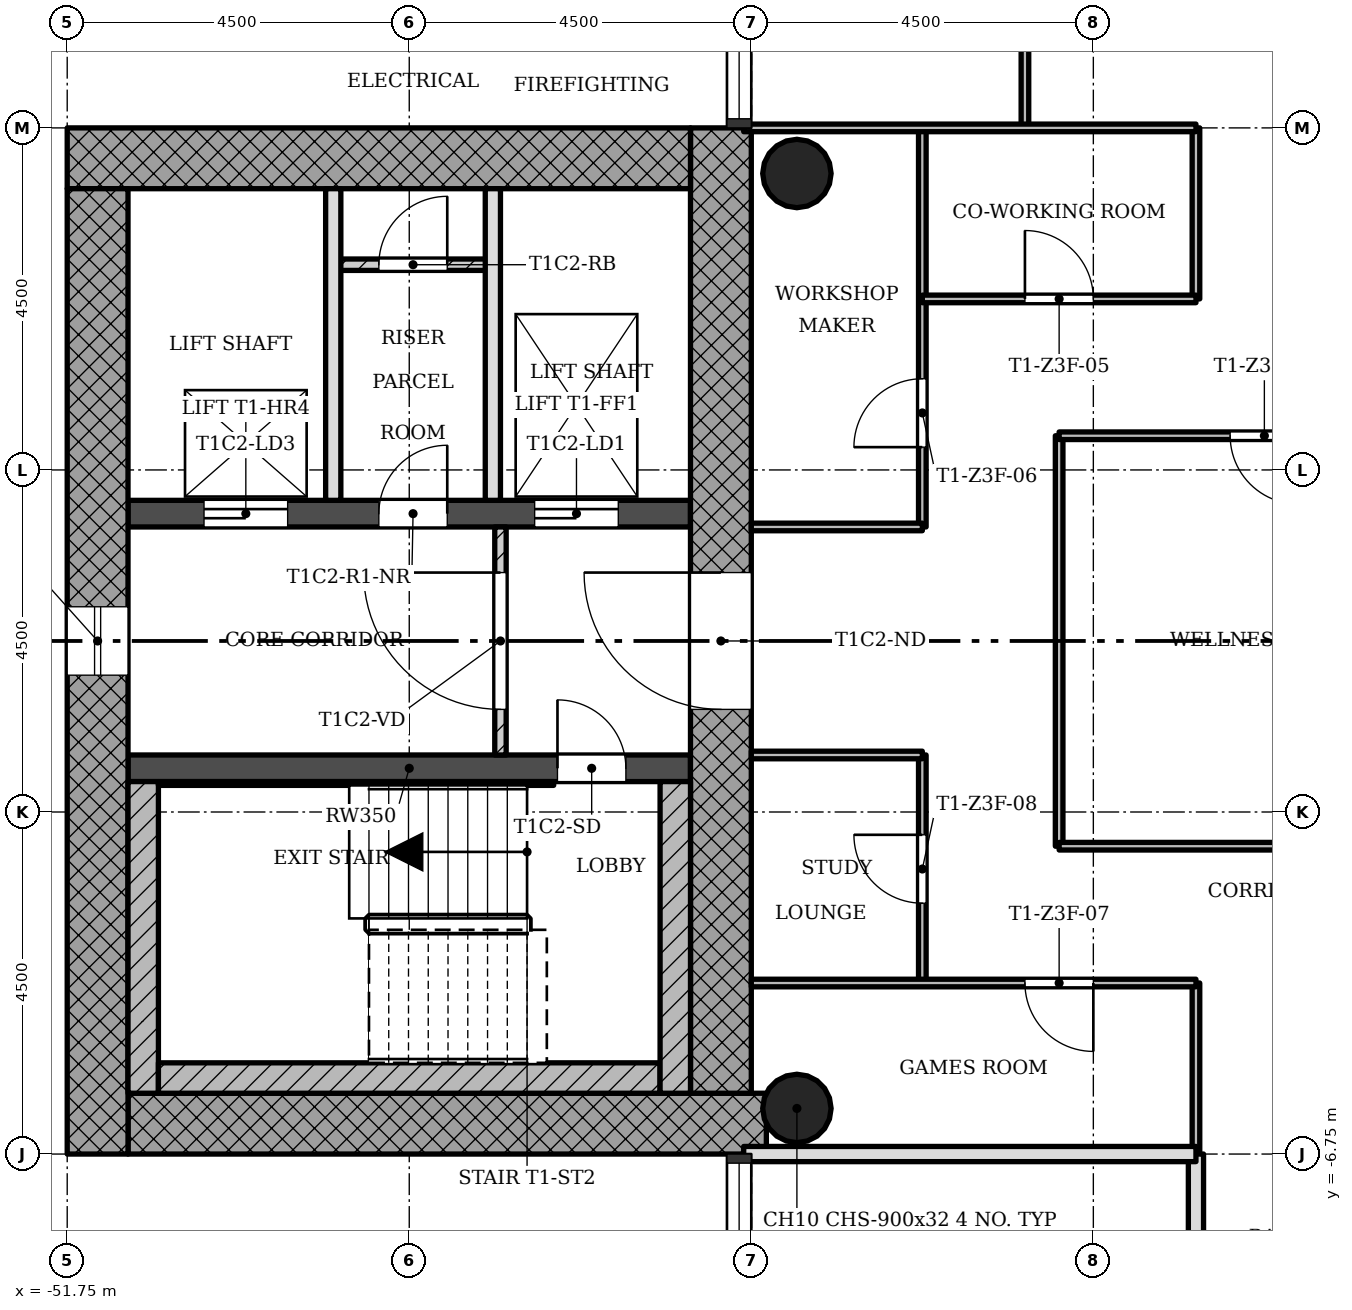
"""IFC4 building model, lengths in metres.
Left out: names, types, materials, properties, quantities, classifications, styles, units other than length and angle.
Written with IfcOpenShell. Run it as: python <this file> out.ifc"""

import sys

from ifc_helpers import new_model, si_unit, direction, frame, frame_2d, origin, origin_2d, place, context, subcontext, project, spatial, rectangle, hollow_circle, extrude, element, fill, save


model = new_model("IFC4")
c1 = context("Model", 3, precision=1e-05, world=origin(), true_north=direction((0.0, 1.0)))
c2 = subcontext(c1, "Body", "Model", "MODEL_VIEW")
j1 = project(units=[si_unit("LENGTHUNIT", "METRE"), si_unit("PLANEANGLEUNIT", "RADIAN")], contexts=[c1])
p1 = place(None, origin())
s1 = spatial("IfcSite", under=j1, at=p1, CompositionType="ELEMENT")
p2 = place(p1, origin())
s2 = spatial("IfcBuilding", under=s1, at=p2, CompositionType="ELEMENT")
p3 = place(p2, frame((0.0, 0.0, 167.7)))
s3 = spatial("IfcBuildingStorey", under=s2, at=p3, CompositionType="ELEMENT", Elevation=167.7)
p4 = place(p3, frame((-50.95, -6.35, 0.0), z_axis=(0.0, 0.0, 1.0), x_axis=(1.0, 0.0, 0.0)))
e1 = element("IfcWall", 1, at=p4, inside=s3, PredefinedType="SHEAR", context=c2, shape_type="SweptSolid", body=[
    extrude(rectangle(XDim=8.398, YDim=0.8, at=frame_2d((4.199, 0.0))), origin(), (0.0, 0.0, 1.0), 3.4),
])
p5 = place(p3, frame((-43.15, -5.95, 0.0), z_axis=(0.0, 0.0, 1.0), x_axis=(0.0, 1.0, 0.0)))
e2 = element("IfcWall", 2, at=p5, inside=s3, PredefinedType="SHEAR", context=c2, shape_type="SweptSolid", body=[
    extrude(rectangle(XDim=12.7, YDim=0.8, at=frame_2d((6.35, 0.0))), origin(), (0.0, 0.0, 1.0), 3.4),
])
p6 = place(p5, frame((5.05, 0.0, 0.0)))
e3 = element("IfcOpeningElement", 3, at=p6, cuts=e2, PredefinedType="OPENING", context=c2, shape_type="SweptSolid", body=[
    extrude(rectangle(XDim=1.8, YDim=2.1, at=frame_2d((0.9, 1.05))), frame((0.0, 0.41, 0.0), z_axis=(0.0, -1.0, 0.0), x_axis=(1.0, 0.0, 0.0)), (0.0, 0.0, 1.0), 0.82),
])
p7 = place(p3, frame((-43.55, 6.35, 0.0), z_axis=(0.0, 0.0, 1.0), x_axis=(-1.0, 0.0, 0.0)))
e4 = element("IfcWall", 4, at=p7, inside=s3, PredefinedType="SHEAR", context=c2, shape_type="SweptSolid", body=[
    extrude(rectangle(XDim=8.2, YDim=0.8, at=frame_2d((4.1, 0.0))), origin(), (0.0, 0.0, 1.0), 3.4),
])
p8 = place(p3, frame((-51.35, 5.95, 0.0), z_axis=(0.0, 0.0, 1.0), x_axis=(0.0, -1.0, 0.0)))
e5 = element("IfcWall", 5, at=p8, inside=s3, PredefinedType="SHEAR", context=c2, shape_type="SweptSolid", body=[
    extrude(rectangle(XDim=12.7, YDim=0.8, at=frame_2d((6.35, 0.0))), origin(), (0.0, 0.0, 1.0), 3.4),
])
p9 = place(p8, frame((5.5, 0.0, 0.45)))
e6 = element("IfcOpeningElement", 6, at=p9, cuts=e5, PredefinedType="OPENING", context=c2, shape_type="SweptSolid", body=[
    extrude(rectangle(XDim=0.9, YDim=2.4, at=frame_2d((0.45, 1.2))), frame((0.0, 0.41, 0.0), z_axis=(0.0, -1.0, 0.0), x_axis=(1.0, 0.0, 0.0)), (0.0, 0.0, 1.0), 0.82),
])
p10 = place(p3, frame((-50.95, -1.675, 0.0), z_axis=(0.0, 0.0, 1.0), x_axis=(1.0, 0.0, 0.0)))
e7 = element("IfcWall", 7, at=p10, inside=s3, PredefinedType="SHEAR", context=c2, shape_type="SweptSolid", body=[
    extrude(rectangle(XDim=7.4, YDim=0.35, at=frame_2d((3.7, 0.0))), origin(), (0.0, 0.0, 1.0), 3.4),
])
p11 = place(p10, frame((5.65, 0.0, 0.0)))
e8 = element("IfcOpeningElement", 8, at=p11, cuts=e7, PredefinedType="OPENING", context=c2, shape_type="SweptSolid", body=[
    extrude(rectangle(XDim=0.9, YDim=2.1, at=frame_2d((0.45, 1.05))), frame((0.0, 0.185, 0.0), z_axis=(0.0, -1.0, 0.0), x_axis=(1.0, 0.0, 0.0)), (0.0, 0.0, 1.0), 0.37),
])
p12 = place(p3, frame((-50.95, 1.675, 0.0), z_axis=(0.0, 0.0, 1.0), x_axis=(1.0, 0.0, 0.0)))
e9 = element("IfcWall", 9, at=p12, inside=s3, PredefinedType="SHEAR", context=c2, shape_type="SweptSolid", body=[
    extrude(rectangle(XDim=7.4, YDim=0.35, at=frame_2d((3.7, 0.0))), origin(), (0.0, 0.0, 1.0), 3.4),
])
p13 = place(p12, frame((5.35, 0.0, 0.0)))
e10 = element("IfcOpeningElement", 10, at=p13, cuts=e9, PredefinedType="OPENING", context=c2, shape_type="SweptSolid", body=[
    extrude(rectangle(XDim=1.1, YDim=2.1, at=frame_2d((0.55, 1.05))), frame((0.0, 0.185, 0.0), z_axis=(0.0, -1.0, 0.0), x_axis=(1.0, 0.0, 0.0)), (0.0, 0.0, 1.0), 0.37),
])
p14 = place(p12, frame((1.0, 0.0, 0.0)))
e11 = element("IfcOpeningElement", 11, at=p14, cuts=e9, PredefinedType="OPENING", context=c2, shape_type="SweptSolid", body=[
    extrude(rectangle(XDim=1.1, YDim=2.1, at=frame_2d((0.55, 1.05))), frame((0.0, 0.185, 0.0), z_axis=(0.0, -1.0, 0.0), x_axis=(1.0, 0.0, 0.0)), (0.0, 0.0, 1.0), 0.37),
])
p15 = place(p12, frame((3.3, 0.0, 0.0)))
e12 = element("IfcOpeningElement", 12, at=p15, cuts=e9, PredefinedType="OPENING", context=c2, shape_type="SweptSolid", body=[
    extrude(rectangle(XDim=0.9, YDim=2.1, at=frame_2d((0.45, 1.05))), frame((0.0, 0.185, 0.0), z_axis=(0.0, -1.0, 0.0), x_axis=(1.0, 0.0, 0.0)), (0.0, 0.0, 1.0), 0.37),
])
for number, where, z_axis, x_axis in (
    (13, (-42.15, -6.15, 0.0), (0.0, 0.0, 1.0), (1.0, 0.0, 0.0)),
    (14, (-42.15, 6.15, 0.0), (0.0, 0.0, 1.0), (1.0, 0.0, 0.0)),
):
    element("IfcColumn", number, at=place(p3, frame(where, z_axis=z_axis, x_axis=x_axis)), inside=s3, PredefinedType="COLUMN", context=c2, shape_type="SweptSolid", body=[
        extrude(hollow_circle(Radius=0.45, WallThickness=0.032, at=origin_2d()), origin(), (0.0, 0.0, 1.0), 3.4),
    ])
p16 = place(p3, frame((-46.05, 1.5, 0.0), z_axis=(0.0, 0.0, 1.0), x_axis=(0.0, -1.0, 0.0)))
e15 = element("IfcWall", 15, at=p16, inside=s3, PredefinedType="PARTITIONING", context=c2, shape_type="SweptSolid", body=[
    extrude(rectangle(XDim=3.0, YDim=0.15, at=frame_2d((1.5, 0.0))), origin(), (0.0, 0.0, 1.0), 3.0),
])
p17 = place(p16, frame((0.6, 0.0, 0.0)))
e16 = element("IfcOpeningElement", 16, at=p17, cuts=e15, PredefinedType="OPENING", context=c2, shape_type="SweptSolid", body=[
    extrude(rectangle(XDim=1.8, YDim=2.1, at=frame_2d((0.9, 1.05))), frame((0.0, 0.085, 0.0), z_axis=(0.0, -1.0, 0.0), x_axis=(1.0, 0.0, 0.0)), (0.0, 0.0, 1.0), 0.17),
])
for number, where, z_axis, x_axis in (
    (17, (-48.25, 5.95, 0.0), (0.0, 0.0, 1.0), (0.0, -1.0, 0.0)),
    (18, (-46.15, 5.95, 0.0), (0.0, 0.0, 1.0), (0.0, -1.0, 0.0)),
):
    element("IfcWall", number, at=place(p3, frame(where, z_axis=z_axis, x_axis=x_axis)), inside=s3, PredefinedType="SOLIDWALL", context=c2, shape_type="SweptSolid", body=[
        extrude(rectangle(XDim=4.1, YDim=0.2, at=frame_2d((2.05, 0.0))), origin(), (0.0, 0.0, 1.0), 3.0),
    ])
p18 = place(p3, frame((-46.15, 4.95, 0.0), z_axis=(0.0, 0.0, 1.0), x_axis=(-1.0, 0.0, 0.0)))
e19 = element("IfcWall", 19, at=p18, inside=s3, PredefinedType="PARTITIONING", context=c2, shape_type="SweptSolid", body=[
    extrude(rectangle(XDim=2.1, YDim=0.15, at=frame_2d((1.05, 0.0))), origin(), (0.0, 0.0, 1.0), 3.0),
])
p19 = place(p18, frame((0.6, 0.0, 0.0)))
e20 = element("IfcOpeningElement", 20, at=p19, cuts=e19, PredefinedType="OPENING", context=c2, shape_type="SweptSolid", body=[
    extrude(rectangle(XDim=0.9, YDim=2.1, at=frame_2d((0.45, 1.05))), frame((0.0, 0.085, 0.0), z_axis=(0.0, -1.0, 0.0), x_axis=(1.0, 0.0, 0.0)), (0.0, 0.0, 1.0), 0.17),
])
p20 = place(p3, frame((-40.5, -4.5, 0.0), z_axis=(0.0, 0.0, 1.0), x_axis=(0.0, 1.0, 0.0)))
e21 = element("IfcWall", 21, at=p20, inside=s3, PredefinedType="PARTITIONING", context=c2, shape_type="SweptSolid", body=[
    extrude(rectangle(XDim=3.0, YDim=0.1, at=frame_2d((1.5, 0.0))), origin(), (0.0, 0.0, 1.0), 3.0),
])
p21 = place(p20, frame((1.05, 0.0, 0.0)))
e22 = element("IfcOpeningElement", 22, at=p21, cuts=e21, PredefinedType="OPENING", context=c2, shape_type="SweptSolid", body=[
    extrude(rectangle(XDim=0.9, YDim=2.1, at=frame_2d((0.45, 1.05))), frame((0.0, 0.06, 0.0), z_axis=(0.0, -1.0, 0.0), x_axis=(1.0, 0.0, 0.0)), (0.0, 0.0, 1.0), 0.12),
])
p22 = place(p3, frame((-40.5, 1.5, 0.0), z_axis=(0.0, 0.0, 1.0), x_axis=(0.0, 1.0, 0.0)))
e23 = element("IfcWall", 23, at=p22, inside=s3, PredefinedType="PARTITIONING", context=c2, shape_type="SweptSolid", body=[
    extrude(rectangle(XDim=5.25, YDim=0.1, at=frame_2d((2.625, 0.0))), origin(), (0.0, 0.0, 1.0), 3.0),
])
p23 = place(p22, frame((1.05, 0.0, 0.0)))
e24 = element("IfcOpeningElement", 24, at=p23, cuts=e23, PredefinedType="OPENING", context=c2, shape_type="SweptSolid", body=[
    extrude(rectangle(XDim=0.9, YDim=2.1, at=frame_2d((0.45, 1.05))), frame((0.0, 0.06, 0.0), z_axis=(0.0, -1.0, 0.0), x_axis=(1.0, 0.0, 0.0)), (0.0, 0.0, 1.0), 0.12),
])
p24 = place(p3, frame((-39.15, 6.75, 0.0), z_axis=(0.0, 0.0, 1.0), x_axis=(0.0, 1.0, 0.0)))
e25 = element("IfcWall", 25, at=p24, inside=s3, PredefinedType="PARTITIONING", context=c2, shape_type="SweptSolid", body=[
    extrude(rectangle(XDim=4.5, YDim=0.1, at=frame_2d((2.25, 0.0))), origin(), (0.0, 0.0, 1.0), 3.0),
])
p25 = place(p24, frame((1.8, 0.0, 0.0)))
e26 = element("IfcOpeningElement", 26, at=p25, cuts=e25, PredefinedType="OPENING", context=c2, shape_type="SweptSolid", body=[
    extrude(rectangle(XDim=0.9, YDim=2.1, at=frame_2d((0.45, 1.05))), frame((0.0, 0.06, 0.0), z_axis=(0.0, -1.0, 0.0), x_axis=(1.0, 0.0, 0.0)), (0.0, 0.0, 1.0), 0.12),
])
p26 = place(p3, frame((-38.7, -2.7, 0.0), z_axis=(0.0, 0.0, 1.0), x_axis=(0.0, 1.0, 0.0)))
e27 = element("IfcWall", 27, at=p26, inside=s3, PredefinedType="PARTITIONING", context=c2, shape_type="SweptSolid", body=[
    extrude(rectangle(XDim=5.4, YDim=0.1, at=frame_2d((2.7, 0.0))), origin(), (0.0, 0.0, 1.0), 3.0),
])
for number, where, z_axis, x_axis in (
    (28, (-36.9, -6.75, 0.0), (0.0, 0.0, 1.0), (0.0, 1.0, 0.0)),
    (29, (-36.9, 4.5, 0.0), (0.0, 0.0, 1.0), (0.0, 1.0, 0.0)),
):
    element("IfcWall", number, at=place(p3, frame(where, z_axis=z_axis, x_axis=x_axis)), inside=s3, PredefinedType="PARTITIONING", context=c2, shape_type="SweptSolid", body=[
        extrude(rectangle(XDim=2.25, YDim=0.1, at=frame_2d((1.125, 0.0))), origin(), (0.0, 0.0, 1.0), 3.0),
    ])
p27 = place(p3, frame((-36.9, -8.55, 0.0), z_axis=(0.0, 0.0, 1.0), x_axis=(0.0, 1.0, 0.0)))
e30 = element("IfcWall", 30, at=p27, inside=s3, PredefinedType="SOLIDWALL", context=c2, shape_type="SweptSolid", body=[
    extrude(rectangle(XDim=1.8, YDim=0.2, at=frame_2d((0.9, 0.0))), origin(), (0.0, 0.0, 1.0), 3.0),
])
p28 = place(p3, frame((-42.85, -6.75, 0.0), z_axis=(0.0, 0.0, 1.0), x_axis=(1.0, 0.0, 0.0)))
e31 = element("IfcWall", 31, at=p28, inside=s3, PredefinedType="SOLIDWALL", context=c2, shape_type="SweptSolid", body=[
    extrude(rectangle(XDim=5.95, YDim=0.2, at=frame_2d((2.975, 0.0))), origin(), (0.0, 0.0, 1.0), 3.0),
])
p29 = place(p3, frame((-42.75, -4.5, 0.0), z_axis=(0.0, 0.0, 1.0), x_axis=(1.0, 0.0, 0.0)))
e32 = element("IfcWall", 32, at=p29, inside=s3, PredefinedType="PARTITIONING", context=c2, shape_type="SweptSolid", body=[
    extrude(rectangle(XDim=5.85, YDim=0.1, at=frame_2d((2.925, 0.0))), origin(), (0.0, 0.0, 1.0), 3.0),
])
p30 = place(p29, frame((3.6, 0.0, 0.0)))
e33 = element("IfcOpeningElement", 33, at=p30, cuts=e32, PredefinedType="OPENING", context=c2, shape_type="SweptSolid", body=[
    extrude(rectangle(XDim=0.9, YDim=2.1, at=frame_2d((0.45, 1.05))), frame((0.0, 0.06, 0.0), z_axis=(0.0, -1.0, 0.0), x_axis=(1.0, 0.0, 0.0)), (0.0, 0.0, 1.0), 0.12),
])
p31 = place(p3, frame((-38.7, -2.7, 0.0), z_axis=(0.0, 0.0, 1.0), x_axis=(1.0, 0.0, 0.0)))
e34 = element("IfcWall", 34, at=p31, inside=s3, PredefinedType="PARTITIONING", context=c2, shape_type="SweptSolid", body=[
    extrude(rectangle(XDim=5.4, YDim=0.1, at=frame_2d((2.7, 0.0))), origin(), (0.0, 0.0, 1.0), 3.0),
])
for number, where, z_axis, x_axis in (
    (35, (-42.75, -1.5, 0.0), (0.0, 0.0, 1.0), (1.0, 0.0, 0.0)),
    (36, (-42.75, 1.5, 0.0), (0.0, 0.0, 1.0), (1.0, 0.0, 0.0)),
):
    element("IfcWall", number, at=place(p3, frame(where, z_axis=z_axis, x_axis=x_axis)), inside=s3, PredefinedType="PARTITIONING", context=c2, shape_type="SweptSolid", body=[
        extrude(rectangle(XDim=2.25, YDim=0.1, at=frame_2d((1.125, 0.0))), origin(), (0.0, 0.0, 1.0), 3.0),
    ])
p32 = place(p3, frame((-38.7, 2.7, 0.0), z_axis=(0.0, 0.0, 1.0), x_axis=(1.0, 0.0, 0.0)))
e37 = element("IfcWall", 37, at=p32, inside=s3, PredefinedType="PARTITIONING", context=c2, shape_type="SweptSolid", body=[
    extrude(rectangle(XDim=5.4, YDim=0.1, at=frame_2d((2.7, 0.0))), origin(), (0.0, 0.0, 1.0), 3.0),
])
p33 = place(p32, frame((2.25, 0.0, 0.0)))
e38 = element("IfcOpeningElement", 38, at=p33, cuts=e37, PredefinedType="OPENING", context=c2, shape_type="SweptSolid", body=[
    extrude(rectangle(XDim=0.9, YDim=2.1, at=frame_2d((0.45, 1.05))), frame((0.0, 0.06, 0.0), z_axis=(0.0, -1.0, 0.0), x_axis=(1.0, 0.0, 0.0)), (0.0, 0.0, 1.0), 0.12),
])
p34 = place(p3, frame((-40.5, 4.5, 0.0), z_axis=(0.0, 0.0, 1.0), x_axis=(1.0, 0.0, 0.0)))
e39 = element("IfcWall", 39, at=p34, inside=s3, PredefinedType="PARTITIONING", context=c2, shape_type="SweptSolid", body=[
    extrude(rectangle(XDim=3.6, YDim=0.1, at=frame_2d((1.8, 0.0))), origin(), (0.0, 0.0, 1.0), 3.0),
])
p35 = place(p34, frame((1.35, 0.0, 0.0)))
e40 = element("IfcOpeningElement", 40, at=p35, cuts=e39, PredefinedType="OPENING", context=c2, shape_type="SweptSolid", body=[
    extrude(rectangle(XDim=0.9, YDim=2.1, at=frame_2d((0.45, 1.05))), frame((0.0, 0.06, 0.0), z_axis=(0.0, -1.0, 0.0), x_axis=(1.0, 0.0, 0.0)), (0.0, 0.0, 1.0), 0.12),
])
p36 = place(p3, frame((-42.85, 6.75, 0.0), z_axis=(0.0, 0.0, 1.0), x_axis=(1.0, 0.0, 0.0)))
e41 = element("IfcWall", 41, at=p36, inside=s3, PredefinedType="PARTITIONING", context=c2, shape_type="SweptSolid", body=[
    extrude(rectangle(XDim=5.95, YDim=0.1, at=frame_2d((2.975, 0.0))), origin(), (0.0, 0.0, 1.0), 3.0),
])
p37 = place(p3, frame((-50.75, -1.85, 0.0), z_axis=(0.0, 0.0, 1.0), x_axis=(0.0, -1.0, 0.0)))
e42 = element("IfcWall", 42, at=p37, inside=s3, PredefinedType="SHEAR", context=c2, shape_type="SweptSolid", body=[
    extrude(rectangle(XDim=4.1, YDim=0.4, at=frame_2d((2.05, 0.0))), origin(), (0.0, 0.0, 1.0), 3.4),
])
p38 = place(p3, frame((-43.95, -5.75, 0.0), z_axis=(0.0, 0.0, 1.0), x_axis=(-1.0, 0.0, 0.0)))
e43 = element("IfcWall", 43, at=p38, inside=s3, PredefinedType="SHEAR", context=c2, shape_type="SweptSolid", body=[
    extrude(rectangle(XDim=6.6, YDim=0.4, at=frame_2d((3.3, 0.0))), origin(), (0.0, 0.0, 1.0), 3.4),
])
p39 = place(p3, frame((-43.75, -1.85, 0.0), z_axis=(0.0, 0.0, 1.0), x_axis=(0.0, -1.0, 0.0)))
e44 = element("IfcWall", 44, at=p39, inside=s3, PredefinedType="SHEAR", context=c2, shape_type="SweptSolid", body=[
    extrude(rectangle(XDim=4.1, YDim=0.4, at=frame_2d((2.05, 0.0))), origin(), (0.0, 0.0, 1.0), 3.4),
])
p40 = place(p3, frame((-45.35, -1.875, 0.0), z_axis=(0.0, 0.0, 1.0), x_axis=(-1.0, 0.0, 0.0)))
e45 = element("IfcWall", 45, at=p40, inside=s3, PredefinedType="SHEAR", context=c2, shape_type="SweptSolid", body=[
    extrude(rectangle(XDim=5.2, YDim=0.05, at=frame_2d((2.6, 0.0))), origin(), (0.0, 0.0, 1.0), 3.4),
])
p41 = place(p9, origin())
e46 = element("IfcWindow", 46, at=p41, inside=s3, PartitioningType="SINGLE_PANEL", PredefinedType="WINDOW", context=c2, shape_type="SweptSolid", body=[
    extrude(rectangle(XDim=0.9, YDim=2.4, at=frame_2d((0.45, 1.2))), frame((0.0, 0.03, 0.0), z_axis=(0.0, -1.0, 0.0), x_axis=(1.0, 0.0, 0.0)), (0.0, 0.0, 1.0), 0.06),
])
fill(e6, e46)
p42 = place(p17, origin())
e47 = element("IfcDoor", 47, at=p42, inside=s3, OperationType="SINGLE_SWING_LEFT", PredefinedType="DOOR", context=c2, shape_type="SweptSolid", body=[
    extrude(rectangle(XDim=1.8, YDim=2.1, at=frame_2d((0.9, 1.05))), frame((0.0, 0.025, 0.0), z_axis=(0.0, -1.0, 0.0), x_axis=(1.0, 0.0, 0.0)), (0.0, 0.0, 1.0), 0.05),
])
fill(e16, e47)
p43 = place(p19, origin())
e48 = element("IfcDoor", 48, at=p43, inside=s3, OperationType="SINGLE_SWING_LEFT", PredefinedType="DOOR", context=c2, shape_type="SweptSolid", body=[
    extrude(rectangle(XDim=0.9, YDim=2.1, at=frame_2d((0.45, 1.05))), frame((0.0, 0.025, 0.0), z_axis=(0.0, -1.0, 0.0), x_axis=(1.0, 0.0, 0.0)), (0.0, 0.0, 1.0), 0.05),
])
fill(e20, e48)
p44 = place(p33, origin())
e49 = element("IfcDoor", 49, at=p44, inside=s3, OperationType="SINGLE_SWING_RIGHT", PredefinedType="DOOR", context=c2, shape_type="SweptSolid", body=[
    extrude(rectangle(XDim=0.9, YDim=2.1, at=frame_2d((0.45, 1.05))), frame((0.0, 0.025, 0.0), z_axis=(0.0, -1.0, 0.0), x_axis=(1.0, 0.0, 0.0)), (0.0, 0.0, 1.0), 0.05),
])
fill(e38, e49)
p45 = place(p35, origin())
e50 = element("IfcDoor", 50, at=p45, inside=s3, OperationType="SINGLE_SWING_RIGHT", PredefinedType="DOOR", context=c2, shape_type="SweptSolid", body=[
    extrude(rectangle(XDim=0.9, YDim=2.1, at=frame_2d((0.45, 1.05))), frame((0.0, 0.025, 0.0), z_axis=(0.0, -1.0, 0.0), x_axis=(1.0, 0.0, 0.0)), (0.0, 0.0, 1.0), 0.05),
])
fill(e40, e50)
p46 = place(p23, origin())
e51 = element("IfcDoor", 51, at=p46, inside=s3, OperationType="SINGLE_SWING_RIGHT", PredefinedType="DOOR", context=c2, shape_type="SweptSolid", body=[
    extrude(rectangle(XDim=0.9, YDim=2.1, at=frame_2d((0.45, 1.05))), frame((0.0, 0.025, 0.0), z_axis=(0.0, -1.0, 0.0), x_axis=(1.0, 0.0, 0.0)), (0.0, 0.0, 1.0), 0.05),
])
fill(e24, e51)
p47 = place(p30, origin())
e52 = element("IfcDoor", 52, at=p47, inside=s3, OperationType="SINGLE_SWING_RIGHT", PredefinedType="DOOR", context=c2, shape_type="SweptSolid", body=[
    extrude(rectangle(XDim=0.9, YDim=2.1, at=frame_2d((0.45, 1.05))), frame((0.0, 0.025, 0.0), z_axis=(0.0, -1.0, 0.0), x_axis=(1.0, 0.0, 0.0)), (0.0, 0.0, 1.0), 0.05),
])
fill(e33, e52)
p48 = place(p21, origin())
e53 = element("IfcDoor", 53, at=p48, inside=s3, OperationType="SINGLE_SWING_LEFT", PredefinedType="DOOR", context=c2, shape_type="SweptSolid", body=[
    extrude(rectangle(XDim=0.9, YDim=2.1, at=frame_2d((0.45, 1.05))), frame((0.0, 0.025, 0.0), z_axis=(0.0, -1.0, 0.0), x_axis=(1.0, 0.0, 0.0)), (0.0, 0.0, 1.0), 0.05),
])
fill(e22, e53)
p49 = place(p11, origin())
e54 = element("IfcDoor", 54, at=p49, inside=s3, OperationType="SINGLE_SWING_RIGHT", PredefinedType="DOOR", context=c2, shape_type="SweptSolid", body=[
    extrude(rectangle(XDim=0.9, YDim=2.1, at=frame_2d((0.45, 1.05))), frame((0.0, 0.025, 0.0), z_axis=(0.0, -1.0, 0.0), x_axis=(1.0, 0.0, 0.0)), (0.0, 0.0, 1.0), 0.05),
])
fill(e8, e54)
p50 = place(p13, origin())
e55 = element("IfcDoor", 55, at=p50, inside=s3, OperationType="SLIDING_TO_LEFT", PredefinedType="DOOR", context=c2, shape_type="SweptSolid", body=[
    extrude(rectangle(XDim=1.1, YDim=2.1, at=frame_2d((0.55, 1.05))), frame((0.0, 0.025, 0.0), z_axis=(0.0, -1.0, 0.0), x_axis=(1.0, 0.0, 0.0)), (0.0, 0.0, 1.0), 0.05),
])
fill(e10, e55)
p51 = place(p14, origin())
e56 = element("IfcDoor", 56, at=p51, inside=s3, OperationType="SLIDING_TO_LEFT", PredefinedType="DOOR", context=c2, shape_type="SweptSolid", body=[
    extrude(rectangle(XDim=1.1, YDim=2.1, at=frame_2d((0.55, 1.05))), frame((0.0, 0.025, 0.0), z_axis=(0.0, -1.0, 0.0), x_axis=(1.0, 0.0, 0.0)), (0.0, 0.0, 1.0), 0.05),
])
fill(e11, e56)
p52 = place(p15, origin())
e57 = element("IfcDoor", 57, at=p52, inside=s3, OperationType="SINGLE_SWING_LEFT", PredefinedType="DOOR", context=c2, shape_type="SweptSolid", body=[
    extrude(rectangle(XDim=0.9, YDim=2.1, at=frame_2d((0.45, 1.05))), frame((0.0, 0.025, 0.0), z_axis=(0.0, -1.0, 0.0), x_axis=(1.0, 0.0, 0.0)), (0.0, 0.0, 1.0), 0.05),
])
fill(e12, e57)
p53 = place(p6, origin())
e58 = element("IfcDoor", 58, at=p53, inside=s3, OperationType="SINGLE_SWING_LEFT", PredefinedType="DOOR", context=c2, shape_type="SweptSolid", body=[
    extrude(rectangle(XDim=1.8, YDim=2.1, at=frame_2d((0.9, 1.05))), frame((0.0, 0.025, 0.0), z_axis=(0.0, -1.0, 0.0), x_axis=(1.0, 0.0, 0.0)), (0.0, 0.0, 1.0), 0.05),
])
fill(e3, e58)
save(model, sys.argv[1])
